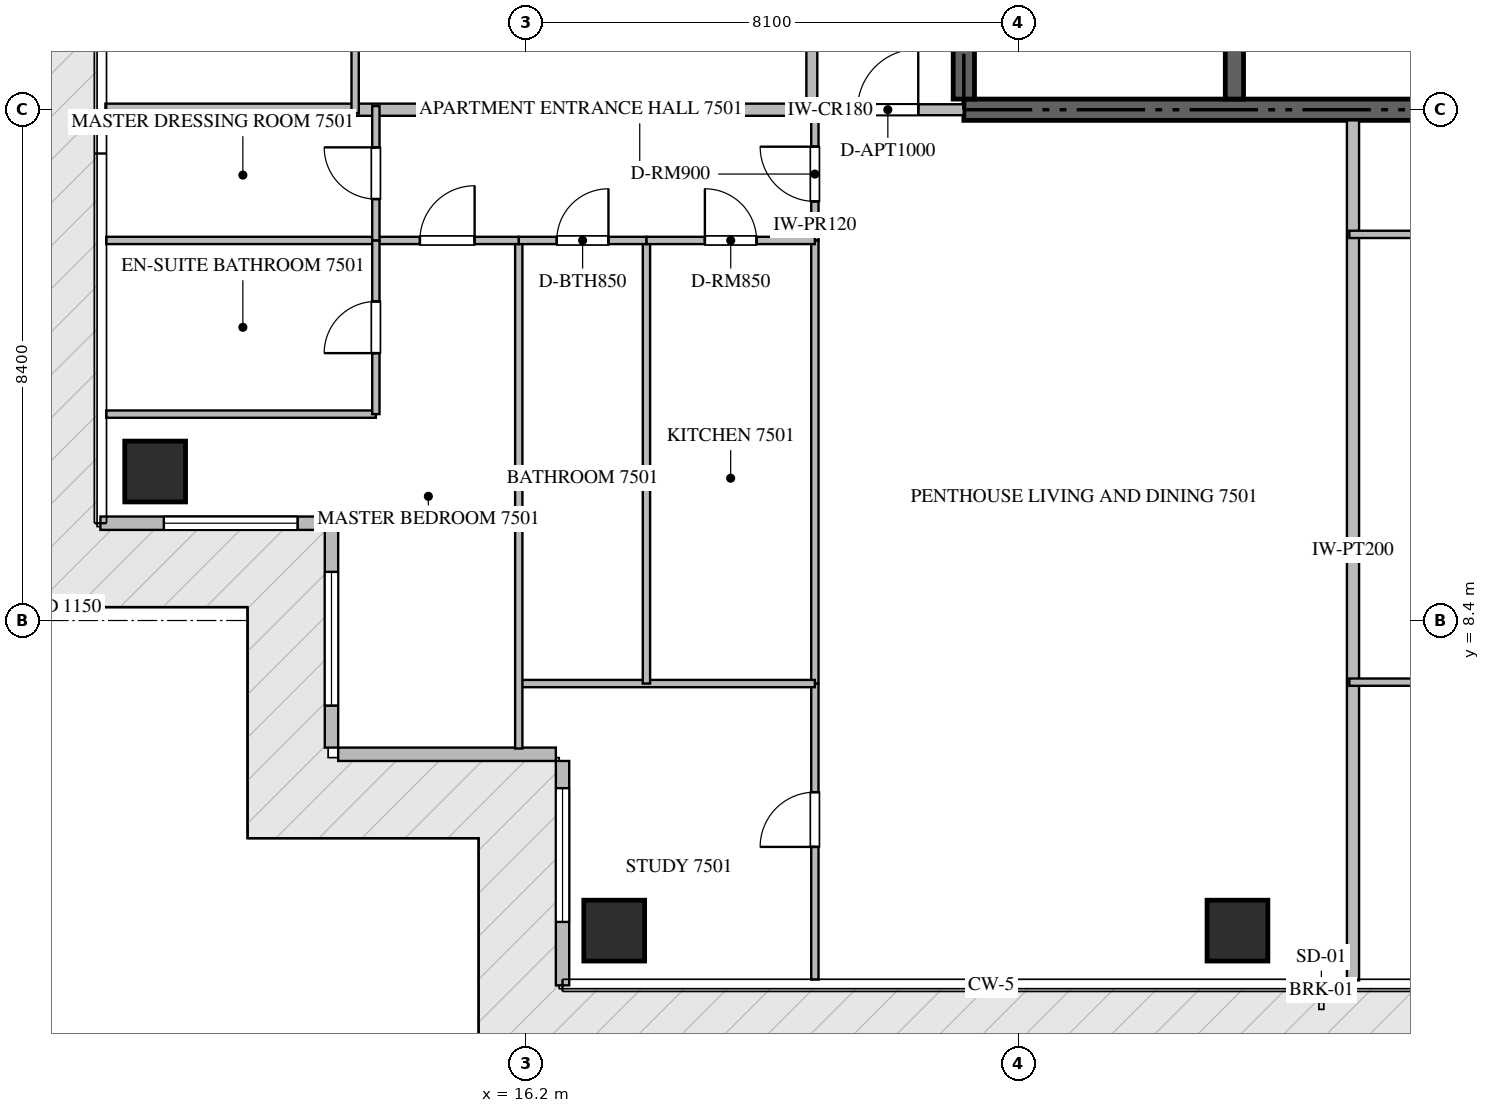
"""IFC4 building model, lengths in metres.
Left out: names, types, materials, properties, quantities, classifications, styles, units other than length and angle.
Written with IfcOpenShell. Run it as: python <this file> out.ifc"""

import sys

from ifc_helpers import new_model, si_unit, direction, frame, frame_2d, origin, origin_2d, place, context, subcontext, project, spatial, rectangle, extrude, source, transform, mapped, element, fill, save


model = new_model("IFC4")
c1 = context("Model", 3, precision=1e-05, world=origin(), true_north=direction((0.0, 1.0)))
c2 = subcontext(c1, "Body", "Model", "MODEL_VIEW")
j1 = project(units=[si_unit("LENGTHUNIT", "METRE"), si_unit("PLANEANGLEUNIT", "RADIAN")], contexts=[c1])
p1 = place(None, origin())
s1 = spatial("IfcSite", under=j1, at=p1, CompositionType="ELEMENT")
p2 = place(p1, origin())
s2 = spatial("IfcBuilding", under=s1, at=p2, CompositionType="ELEMENT")
p3 = place(p2, frame((0.0, 0.0, 301.55)))
s3 = spatial("IfcBuildingStorey", under=s2, at=p3, CompositionType="ELEMENT", Elevation=301.55)
p4 = place(p3, frame((23.4, 16.8, -0.26), z_axis=(0.0, 0.0, 1.0), x_axis=(1.0, 0.0, 0.0)))
e1 = element("IfcWall", 1, at=p4, inside=s3, PredefinedType="SHEAR", context=c2, shape_type="SweptSolid", body=[
    extrude(rectangle(XDim=18.0, YDim=0.35, at=frame_2d((9.0, 0.0))), origin(), (0.0, 0.0, 1.0), 4.048),
])
p5 = place(p3, frame((23.4, 16.975, -0.26), z_axis=(0.0, 0.0, 1.0), x_axis=(0.0, 1.0, 0.0)))
e2 = element("IfcWall", 2, at=p5, inside=s3, PredefinedType="SHEAR", context=c2, shape_type="SweptSolid", body=[
    extrude(rectangle(XDim=4.875, YDim=0.35, at=frame_2d((2.438, 0.0))), origin(), (0.0, 0.0, 1.0), 4.048),
])
p6 = place(p3, frame((27.85, 16.975, -0.26), z_axis=(0.0, 0.0, 1.0), x_axis=(0.0, 1.0, 0.0)))
e3 = element("IfcWall", 3, at=p6, inside=s3, PredefinedType="SHEAR", context=c2, shape_type="SweptSolid", body=[
    extrude(rectangle(XDim=4.875, YDim=0.3, at=frame_2d((2.438, 0.0))), origin(), (0.0, 0.0, 1.0), 4.048),
])
m1 = source(origin(), c2, "Body", "SweptSolid", [
    extrude(rectangle(XDim=1.0, YDim=1.0, at=origin_2d()), origin(), (0.0, 0.0, 1.0), 4.05),
])
for number, where, z_axis, x_axis in (
    (4, (17.65, 3.3, -0.26), (0.0, 0.0, 1.0), (1.0, 0.0, 0.0)),
    (5, (27.9, 3.3, -0.26), (0.0, 0.0, 1.0), (1.0, 0.0, 0.0)),
    (6, (10.1, 10.85, -0.26), (0.0, 0.0, 1.0), (1.0, 0.0, 0.0)),
):
    element("IfcColumn", number, at=place(p3, frame(where, z_axis=z_axis, x_axis=x_axis)), inside=s3, PredefinedType="COLUMN", context=c2, shape_type="MappedRepresentation", body=[
        mapped(m1, transform((0.0, 0.0, 0.0), scale=1.0)),
    ])
p7 = place(p3, frame((9.2, 10.0, 0.0), z_axis=(0.0, 0.0, 1.0), x_axis=(1.0, 0.0, 0.0)))
e7 = element("IfcWall", 7, at=p7, inside=s3, PredefinedType="ELEMENTEDWALL", context=c2, shape_type="SweptSolid", body=[
    extrude(rectangle(XDim=3.69, YDim=0.22, at=frame_2d((1.845, 0.0))), origin(), (0.0, 0.0, 1.0), 3.775),
])
p8 = place(p7, frame((1.043, 0.0, 0.65)))
e8 = element("IfcOpeningElement", 8, at=p8, cuts=e7, PredefinedType="OPENING", context=c2, shape_type="SweptSolid", body=[
    extrude(rectangle(XDim=2.2, YDim=2.4, at=frame_2d((1.1, 1.2))), frame((0.0, 0.12, 0.0), z_axis=(0.0, -1.0, 0.0), x_axis=(1.0, 0.0, 0.0)), (0.0, 0.0, 1.0), 0.24),
])
p9 = place(p3, frame((13.0, 9.89, 0.0), z_axis=(0.0, 0.0, 1.0), x_axis=(0.0, -1.0, 0.0)))
e9 = element("IfcWall", 9, at=p9, inside=s3, PredefinedType="ELEMENTEDWALL", context=c2, shape_type="SweptSolid", body=[
    extrude(rectangle(XDim=3.58, YDim=0.22, at=frame_2d((1.79, 0.0))), origin(), (0.0, 0.0, 1.0), 3.775),
])
p10 = place(p9, frame((0.69, 0.0, 0.65)))
e10 = element("IfcOpeningElement", 10, at=p10, cuts=e9, PredefinedType="OPENING", context=c2, shape_type="SweptSolid", body=[
    extrude(rectangle(XDim=2.2, YDim=2.4, at=frame_2d((1.1, 1.2))), frame((0.0, 0.12, 0.0), z_axis=(0.0, -1.0, 0.0), x_axis=(1.0, 0.0, 0.0)), (0.0, 0.0, 1.0), 0.24),
])
p11 = place(p3, frame((13.11, 6.2, 0.0), z_axis=(0.0, 0.0, 1.0), x_axis=(1.0, 0.0, 0.0)))
e11 = element("IfcWall", 11, at=p11, inside=s3, PredefinedType="ELEMENTEDWALL", context=c2, shape_type="SweptSolid", body=[
    extrude(rectangle(XDim=3.58, YDim=0.22, at=frame_2d((1.79, 0.0))), origin(), (0.0, 0.0, 1.0), 3.775),
])
p12 = place(p3, frame((16.8, 6.09, 0.0), z_axis=(0.0, 0.0, 1.0), x_axis=(0.0, -1.0, 0.0)))
e12 = element("IfcWall", 12, at=p12, inside=s3, PredefinedType="ELEMENTEDWALL", context=c2, shape_type="SweptSolid", body=[
    extrude(rectangle(XDim=3.69, YDim=0.22, at=frame_2d((1.845, 0.0))), origin(), (0.0, 0.0, 1.0), 3.775),
])
p13 = place(p12, frame((0.447, 0.0, 0.65)))
e13 = element("IfcOpeningElement", 13, at=p13, cuts=e12, PredefinedType="OPENING", context=c2, shape_type="SweptSolid", body=[
    extrude(rectangle(XDim=2.2, YDim=2.4, at=frame_2d((1.1, 1.2))), frame((0.0, 0.12, 0.0), z_axis=(0.0, -1.0, 0.0), x_axis=(1.0, 0.0, 0.0)), (0.0, 0.0, 1.0), 0.24),
])
p14 = place(p3, frame((29.8, 2.482, 0.0), z_axis=(0.0, 0.0, 1.0), x_axis=(0.0, 1.0, 0.0)))
e14 = element("IfcWall", 14, at=p14, inside=s3, PredefinedType="PARTITIONING", context=c2, shape_type="SweptSolid", body=[
    extrude(rectangle(XDim=14.143, YDim=0.2, at=frame_2d((7.072, 0.0))), origin(), (0.0, 0.0, 1.0), 3.79),
])
p15 = place(p3, frame((9.282, 16.8, 0.0), z_axis=(0.0, 0.0, 1.0), x_axis=(1.0, 0.0, 0.0)))
e15 = element("IfcWall", 15, at=p15, inside=s3, PredefinedType="PARTITIONING", context=c2, shape_type="SweptSolid", body=[
    extrude(rectangle(XDim=11.618, YDim=0.2, at=frame_2d((5.809, 0.0))), origin(), (0.0, 0.0, 1.0), 3.79),
])
p16 = place(p3, frame((20.902, 16.8, 0.0), z_axis=(0.0, 0.0, 1.0), x_axis=(1.0, 0.0, 0.0)))
e16 = element("IfcWall", 16, at=p16, inside=s3, PredefinedType="PARTITIONING", context=c2, shape_type="SweptSolid", body=[
    extrude(rectangle(XDim=2.496, YDim=0.18, at=frame_2d((1.248, 0.0))), origin(), (0.0, 0.0, 1.0), 3.79),
])
p17 = place(p16, frame((0.748, 0.0, 0.0)))
e17 = element("IfcOpeningElement", 17, at=p17, cuts=e16, PredefinedType="OPENING", context=c2, shape_type="SweptSolid", body=[
    extrude(rectangle(XDim=1.0, YDim=2.15, at=frame_2d((0.5, 1.075))), frame((0.0, 0.1, 0.0), z_axis=(0.0, -1.0, 0.0), x_axis=(1.0, 0.0, 0.0)), (0.0, 0.0, 1.0), 0.2),
])
p18 = place(p3, frame((20.9, 16.8, 0.0), z_axis=(0.0, 0.0, 1.0), x_axis=(0.0, 1.0, 0.0)))
e18 = element("IfcWall", 18, at=p18, inside=s3, PredefinedType="PARTITIONING", context=c2, shape_type="SweptSolid", body=[
    extrude(rectangle(XDim=16.8, YDim=0.18, at=frame_2d((8.4, 0.0))), origin(), (0.0, 0.0, 1.0), 3.79),
])
p19 = place(p18, frame((14.5, 0.0, 0.0)))
e19 = element("IfcOpeningElement", 19, at=p19, cuts=e18, PredefinedType="OPENING", context=c2, shape_type="SweptSolid", body=[
    extrude(rectangle(XDim=1.0, YDim=2.15, at=frame_2d((0.5, 1.075))), frame((0.0, 0.1, 0.0), z_axis=(0.0, -1.0, 0.0), x_axis=(1.0, 0.0, 0.0)), (0.0, 0.0, 1.0), 0.2),
])
p20 = place(p3, frame((20.95, 14.65, 0.0), z_axis=(0.0, 0.0, 1.0), x_axis=(0.0, 1.0, 0.0)))
e20 = element("IfcWall", 20, at=p20, inside=s3, PredefinedType="PARTITIONING", context=c2, shape_type="SweptSolid", body=[
    extrude(rectangle(XDim=2.148, YDim=0.12, at=frame_2d((1.074, 0.0))), origin(), (0.0, 0.0, 1.0), 3.79),
])
p21 = place(p20, frame((0.642, 0.0, 0.0)))
e21 = element("IfcOpeningElement", 21, at=p21, cuts=e20, PredefinedType="OPENING", context=c2, shape_type="SweptSolid", body=[
    extrude(rectangle(XDim=0.9, YDim=2.1, at=frame_2d((0.45, 1.05))), frame((0.0, 0.07, 0.0), z_axis=(0.0, -1.0, 0.0), x_axis=(1.0, 0.0, 0.0)), (0.0, 0.0, 1.0), 0.14),
])
p22 = place(p3, frame((20.95, 2.495, 0.0), z_axis=(0.0, 0.0, 1.0), x_axis=(0.0, 1.0, 0.0)))
e22 = element("IfcWall", 22, at=p22, inside=s3, PredefinedType="PARTITIONING", context=c2, shape_type="SweptSolid", body=[
    extrude(rectangle(XDim=4.868, YDim=0.12, at=frame_2d((2.434, 0.0))), origin(), (0.0, 0.0, 1.0), 3.79),
])
p23 = place(p22, frame((2.182, 0.0, 0.0)))
e23 = element("IfcOpeningElement", 23, at=p23, cuts=e22, PredefinedType="OPENING", context=c2, shape_type="SweptSolid", body=[
    extrude(rectangle(XDim=0.9, YDim=2.1, at=frame_2d((0.45, 1.05))), frame((0.0, 0.07, 0.0), z_axis=(0.0, -1.0, 0.0), x_axis=(1.0, 0.0, 0.0)), (0.0, 0.0, 1.0), 0.14),
])
p24 = place(p3, frame((20.95, 7.365, 0.0), z_axis=(0.0, 0.0, 1.0), x_axis=(0.0, 1.0, 0.0)))
e24 = element("IfcWall", 24, at=p24, inside=s3, PredefinedType="PARTITIONING", context=c2, shape_type="SweptSolid", body=[
    extrude(rectangle(XDim=7.283, YDim=0.12, at=frame_2d((3.642, 0.0))), origin(), (0.0, 0.0, 1.0), 3.79),
])
p25 = place(p3, frame((16.08, 7.363, 0.0), z_axis=(0.0, 0.0, 1.0), x_axis=(1.0, 0.0, 0.0)))
e25 = element("IfcWall", 25, at=p25, inside=s3, PredefinedType="PARTITIONING", context=c2, shape_type="SweptSolid", body=[
    extrude(rectangle(XDim=4.87, YDim=0.12, at=frame_2d((2.435, 0.0))), origin(), (0.0, 0.0, 1.0), 3.79),
])
p26 = place(p3, frame((16.08, 6.295, 0.0), z_axis=(0.0, 0.0, 1.0), x_axis=(0.0, 1.0, 0.0)))
e26 = element("IfcWall", 26, at=p26, inside=s3, PredefinedType="PARTITIONING", context=c2, shape_type="SweptSolid", body=[
    extrude(rectangle(XDim=8.355, YDim=0.12, at=frame_2d((4.177, 0.0))), origin(), (0.0, 0.0, 1.0), 3.79),
])
p27 = place(p3, frame((18.18, 7.363, 0.0), z_axis=(0.0, 0.0, 1.0), x_axis=(0.0, 1.0, 0.0)))
e27 = element("IfcWall", 27, at=p27, inside=s3, PredefinedType="PARTITIONING", context=c2, shape_type="SweptSolid", body=[
    extrude(rectangle(XDim=7.287, YDim=0.12, at=frame_2d((3.644, 0.0))), origin(), (0.0, 0.0, 1.0), 3.79),
])
p28 = place(p3, frame((16.08, 14.65, 0.0), z_axis=(0.0, 0.0, 1.0), x_axis=(1.0, 0.0, 0.0)))
e28 = element("IfcWall", 28, at=p28, inside=s3, PredefinedType="PARTITIONING", context=c2, shape_type="SweptSolid", body=[
    extrude(rectangle(XDim=2.1, YDim=0.12, at=frame_2d((1.05, 0.0))), origin(), (0.0, 0.0, 1.0), 3.79),
])
p29 = place(p28, frame((0.625, 0.0, 0.0)))
e29 = element("IfcOpeningElement", 29, at=p29, cuts=e28, PredefinedType="OPENING", context=c2, shape_type="SweptSolid", body=[
    extrude(rectangle(XDim=0.85, YDim=2.1, at=frame_2d((0.425, 1.05))), frame((0.0, 0.07, 0.0), z_axis=(0.0, -1.0, 0.0), x_axis=(1.0, 0.0, 0.0)), (0.0, 0.0, 1.0), 0.14),
])
p30 = place(p3, frame((18.182, 14.65, 0.0), z_axis=(0.0, 0.0, 1.0), x_axis=(1.0, 0.0, 0.0)))
e30 = element("IfcWall", 30, at=p30, inside=s3, PredefinedType="PARTITIONING", context=c2, shape_type="SweptSolid", body=[
    extrude(rectangle(XDim=2.768, YDim=0.12, at=frame_2d((1.384, 0.0))), origin(), (0.0, 0.0, 1.0), 3.79),
])
p31 = place(p30, frame((0.959, 0.0, 0.0)))
e31 = element("IfcOpeningElement", 31, at=p31, cuts=e30, PredefinedType="OPENING", context=c2, shape_type="SweptSolid", body=[
    extrude(rectangle(XDim=0.85, YDim=2.1, at=frame_2d((0.425, 1.05))), frame((0.0, 0.07, 0.0), z_axis=(0.0, -1.0, 0.0), x_axis=(1.0, 0.0, 0.0)), (0.0, 0.0, 1.0), 0.14),
])
p32 = place(p3, frame((13.73, 14.65, 0.0), z_axis=(0.0, 0.0, 1.0), x_axis=(1.0, 0.0, 0.0)))
e32 = element("IfcWall", 32, at=p32, inside=s3, PredefinedType="PARTITIONING", context=c2, shape_type="SweptSolid", body=[
    extrude(rectangle(XDim=2.348, YDim=0.12, at=frame_2d((1.174, 0.0))), origin(), (0.0, 0.0, 1.0), 3.79),
])
p33 = place(p32, frame((0.724, 0.0, 0.0)))
e33 = element("IfcOpeningElement", 33, at=p33, cuts=e32, PredefinedType="OPENING", context=c2, shape_type="SweptSolid", body=[
    extrude(rectangle(XDim=0.9, YDim=2.1, at=frame_2d((0.45, 1.05))), frame((0.0, 0.07, 0.0), z_axis=(0.0, -1.0, 0.0), x_axis=(1.0, 0.0, 0.0)), (0.0, 0.0, 1.0), 0.14),
])
p34 = place(p3, frame((9.295, 11.794, 0.0), z_axis=(0.0, 0.0, 1.0), x_axis=(1.0, 0.0, 0.0)))
e34 = element("IfcWall", 34, at=p34, inside=s3, PredefinedType="PARTITIONING", context=c2, shape_type="SweptSolid", body=[
    extrude(rectangle(XDim=4.435, YDim=0.12, at=frame_2d((2.218, 0.0))), origin(), (0.0, 0.0, 1.0), 3.79),
])
p35 = place(p3, frame((9.295, 14.65, 0.0), z_axis=(0.0, 0.0, 1.0), x_axis=(1.0, 0.0, 0.0)))
e35 = element("IfcWall", 35, at=p35, inside=s3, PredefinedType="PARTITIONING", context=c2, shape_type="SweptSolid", body=[
    extrude(rectangle(XDim=4.433, YDim=0.12, at=frame_2d((2.217, 0.0))), origin(), (0.0, 0.0, 1.0), 3.79),
])
p36 = place(p3, frame((13.73, 11.794, 0.0), z_axis=(0.0, 0.0, 1.0), x_axis=(0.0, 1.0, 0.0)))
e36 = element("IfcWall", 36, at=p36, inside=s3, PredefinedType="PARTITIONING", context=c2, shape_type="SweptSolid", body=[
    extrude(rectangle(XDim=2.856, YDim=0.12, at=frame_2d((1.428, 0.0))), origin(), (0.0, 0.0, 1.0), 3.79),
])
p37 = place(p36, frame((1.003, 0.0, 0.0)))
e37 = element("IfcOpeningElement", 37, at=p37, cuts=e36, PredefinedType="OPENING", context=c2, shape_type="SweptSolid", body=[
    extrude(rectangle(XDim=0.85, YDim=2.1, at=frame_2d((0.425, 1.05))), frame((0.0, 0.07, 0.0), z_axis=(0.0, -1.0, 0.0), x_axis=(1.0, 0.0, 0.0)), (0.0, 0.0, 1.0), 0.14),
])
p38 = place(p3, frame((13.73, 14.652, 0.0), z_axis=(0.0, 0.0, 1.0), x_axis=(0.0, 1.0, 0.0)))
e38 = element("IfcWall", 38, at=p38, inside=s3, PredefinedType="PARTITIONING", context=c2, shape_type="SweptSolid", body=[
    extrude(rectangle(XDim=2.208, YDim=0.12, at=frame_2d((1.104, 0.0))), origin(), (0.0, 0.0, 1.0), 3.79),
])
p39 = place(p38, frame((0.679, 0.0, 0.0)))
e39 = element("IfcOpeningElement", 39, at=p39, cuts=e38, PredefinedType="OPENING", context=c2, shape_type="SweptSolid", body=[
    extrude(rectangle(XDim=0.85, YDim=2.1, at=frame_2d((0.425, 1.05))), frame((0.0, 0.07, 0.0), z_axis=(0.0, -1.0, 0.0), x_axis=(1.0, 0.0, 0.0)), (0.0, 0.0, 1.0), 0.14),
])
for number, where, z_axis, x_axis in (
    (40, (29.74, 7.386, 0.0), (0.0, 0.0, 1.0), (1.0, 0.0, 0.0)),
    (41, (29.74, 14.75, 0.0), (0.0, 0.0, 1.0), (1.0, 0.0, 0.0)),
):
    element("IfcWall", number, at=place(p3, frame(where, z_axis=z_axis, x_axis=x_axis)), inside=s3, PredefinedType="PARTITIONING", context=c2, shape_type="SweptSolid", body=[
        extrude(rectangle(XDim=8.76, YDim=0.12, at=frame_2d((4.38, 0.0))), origin(), (0.0, 0.0, 1.0), 3.79),
    ])
p40 = place(p3, frame((13.389, 16.74, 0.0), z_axis=(0.0, 0.0, 1.0), x_axis=(0.0, 1.0, 0.0)))
e42 = element("IfcWall", 42, at=p40, inside=s3, PredefinedType="PARTITIONING", context=c2, shape_type="SweptSolid", body=[
    extrude(rectangle(XDim=10.48, YDim=0.12, at=frame_2d((5.24, 0.0))), origin(), (0.0, 0.0, 1.0), 3.79),
])
m2 = source(origin(), c2, "Body", "SweptSolid", [
    extrude(rectangle(XDim=2.2, YDim=2.4, at=frame_2d((1.1, 1.2))), frame((0.0, 0.03, 0.0), z_axis=(0.0, -1.0, 0.0), x_axis=(1.0, 0.0, 0.0)), (0.0, 0.0, 1.0), 0.06),
])
p41 = place(p8, origin())
e43 = element("IfcWindow", 43, at=p41, inside=s3, PartitioningType="SINGLE_PANEL", PredefinedType="WINDOW", context=c2, shape_type="MappedRepresentation", body=[
    mapped(m2, transform((0.0, 0.0, 0.0), scale=1.0)),
])
fill(e8, e43)
p42 = place(p10, origin())
e44 = element("IfcWindow", 44, at=p42, inside=s3, PartitioningType="SINGLE_PANEL", PredefinedType="WINDOW", context=c2, shape_type="MappedRepresentation", body=[
    mapped(m2, transform((0.0, 0.0, 0.0), scale=1.0)),
])
fill(e10, e44)
p43 = place(p13, origin())
e45 = element("IfcWindow", 45, at=p43, inside=s3, PartitioningType="SINGLE_PANEL", PredefinedType="WINDOW", context=c2, shape_type="MappedRepresentation", body=[
    mapped(m2, transform((0.0, 0.0, 0.0), scale=1.0)),
])
fill(e13, e45)
m3 = source(origin(), c2, "Body", "SweptSolid", [
    extrude(rectangle(XDim=1.0, YDim=2.15, at=frame_2d((0.5, 1.075))), frame((0.0, 0.025, 0.0), z_axis=(0.0, -1.0, 0.0), x_axis=(1.0, 0.0, 0.0)), (0.0, 0.0, 1.0), 0.05),
])
p44 = place(p17, origin())
e46 = element("IfcDoor", 46, at=p44, inside=s3, OperationType="SINGLE_SWING_RIGHT", PredefinedType="DOOR", context=c2, shape_type="MappedRepresentation", body=[
    mapped(m3, transform((0.0, 0.0, 0.0), scale=1.0)),
])
fill(e17, e46)
m4 = source(origin(), c2, "Body", "SweptSolid", [
    extrude(rectangle(XDim=0.9, YDim=2.1, at=frame_2d((0.45, 1.05))), frame((0.0, 0.025, 0.0), z_axis=(0.0, -1.0, 0.0), x_axis=(1.0, 0.0, 0.0)), (0.0, 0.0, 1.0), 0.05),
])
p45 = place(p21, origin())
e47 = element("IfcDoor", 47, at=p45, inside=s3, OperationType="SINGLE_SWING_RIGHT", PredefinedType="DOOR", context=c2, shape_type="MappedRepresentation", body=[
    mapped(m4, transform((0.0, 0.0, 0.0), scale=1.0)),
])
fill(e21, e47)
p46 = place(p23, origin())
e48 = element("IfcDoor", 48, at=p46, inside=s3, OperationType="SINGLE_SWING_LEFT", PredefinedType="DOOR", context=c2, shape_type="MappedRepresentation", body=[
    mapped(m4, transform((0.0, 0.0, 0.0), scale=1.0)),
])
fill(e23, e48)
m5 = source(origin(), c2, "Body", "SweptSolid", [
    extrude(rectangle(XDim=0.85, YDim=2.1, at=frame_2d((0.425, 1.05))), frame((0.0, 0.025, 0.0), z_axis=(0.0, -1.0, 0.0), x_axis=(1.0, 0.0, 0.0)), (0.0, 0.0, 1.0), 0.05),
])
p47 = place(p29, origin())
e49 = element("IfcDoor", 49, at=p47, inside=s3, OperationType="SINGLE_SWING_RIGHT", PredefinedType="DOOR", context=c2, shape_type="MappedRepresentation", body=[
    mapped(m5, transform((0.0, 0.0, 0.0), scale=1.0)),
])
fill(e29, e49)
p48 = place(p31, origin())
e50 = element("IfcDoor", 50, at=p48, inside=s3, OperationType="SINGLE_SWING_LEFT", PredefinedType="DOOR", context=c2, shape_type="MappedRepresentation", body=[
    mapped(m5, transform((0.0, 0.0, 0.0), scale=1.0)),
])
fill(e31, e50)
p49 = place(p33, origin())
e51 = element("IfcDoor", 51, at=p49, inside=s3, OperationType="SINGLE_SWING_RIGHT", PredefinedType="DOOR", context=c2, shape_type="MappedRepresentation", body=[
    mapped(m4, transform((0.0, 0.0, 0.0), scale=1.0)),
])
fill(e33, e51)
p50 = place(p37, origin())
e52 = element("IfcDoor", 52, at=p50, inside=s3, OperationType="SINGLE_SWING_LEFT", PredefinedType="DOOR", context=c2, shape_type="MappedRepresentation", body=[
    mapped(m5, transform((0.0, 0.0, 0.0), scale=1.0)),
])
fill(e37, e52)
p51 = place(p39, origin())
e53 = element("IfcDoor", 53, at=p51, inside=s3, OperationType="SINGLE_SWING_RIGHT", PredefinedType="DOOR", context=c2, shape_type="MappedRepresentation", body=[
    mapped(m5, transform((0.0, 0.0, 0.0), scale=1.0)),
])
fill(e39, e53)
save(model, sys.argv[1])
